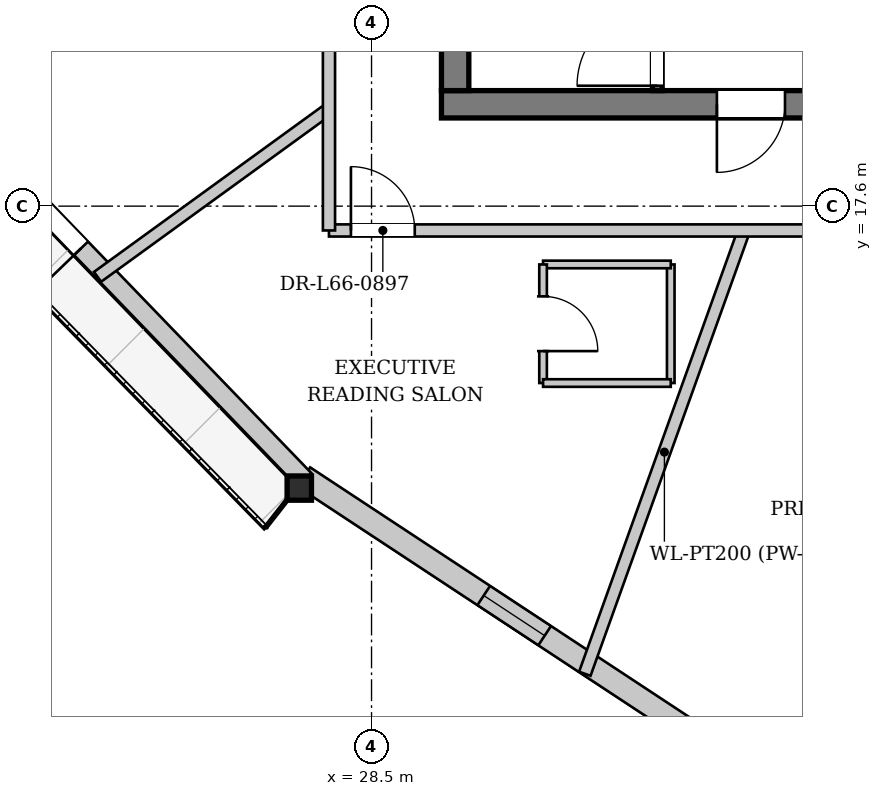
"""IFC4 building model, lengths in metres.
Left out: names, types, materials, properties, quantities, classifications, styles, units other than length and angle.
Written with IfcOpenShell. Run it as: python <this file> out.ifc"""

import sys

from ifc_helpers import new_model, si_unit, direction, frame, frame_2d, origin, origin_2d, place, context, subcontext, project, spatial, rectangle, i_section, extrude, source, transform, mapped, element, fill, save


model = new_model("IFC4")
c1 = context("Model", 3, precision=1e-05, world=origin(), true_north=direction((0.0, 1.0)))
c2 = subcontext(c1, "Body", "Model", "MODEL_VIEW")
j1 = project(units=[si_unit("LENGTHUNIT", "METRE"), si_unit("PLANEANGLEUNIT", "RADIAN")], contexts=[c1])
p1 = place(None, origin())
s1 = spatial("IfcSite", under=j1, at=p1, CompositionType="ELEMENT")
p2 = place(p1, origin())
s2 = spatial("IfcBuilding", under=s1, at=p2, CompositionType="ELEMENT")
p3 = place(p2, frame((0.0, 0.0, 248.9)))
s3 = spatial("IfcBuildingStorey", under=s2, at=p3, CompositionType="ELEMENT", Elevation=248.9)
m1 = source(origin(), c2, "Body", "SweptSolid", [
    extrude(i_section(OverallWidth=0.401, OverallDepth=0.399, WebThickness=0.022, FlangeThickness=0.034, at=origin_2d()), origin(), (0.0, 0.0, 1.0), 3.436),
])
p4 = place(p3, frame((27.282, 12.987, 0.0), z_axis=(0.017266623322, -0.013571708043, 0.999758807143), x_axis=(0.61796443076, 0.786206055888, 0.0)))
e1 = element("IfcColumn", 1, at=p4, inside=s3, PredefinedType="COLUMN", context=c2, shape_type="MappedRepresentation", body=[
    mapped(m1, transform((0.0, 0.0, 0.0), x_axis=(1.0, 0.0, 0.0), y_axis=(0.0, 1.0, 0.0), z_axis=(0.0, 0.0, 1.0), scale=1.0)),
])
p5 = place(p3, frame((41.979, 3.534, 0.0), z_axis=(0.0, 0.0, 1.0), x_axis=(-0.835124059856, 0.550061637136, 0.0)))
e2 = element("IfcWall", 2, at=p5, inside=s3, PredefinedType="SOLIDWALL", context=c2, shape_type="SweptSolid", body=[
    extrude(rectangle(XDim=17.474, YDim=0.38, at=frame_2d((8.737, 0.0))), origin(), (0.0, 0.0, 1.0), 2.872),
])
p6 = place(p5, frame((4.293, 0.0, 0.65)))
e3 = element("IfcOpeningElement", 3, at=p6, cuts=e2, PredefinedType="OPENING", context=c2, shape_type="SweptSolid", body=[
    extrude(rectangle(XDim=1.2, YDim=1.5, at=frame_2d((0.6, 0.75))), frame((0.0, 0.2, 0.0), z_axis=(0.0, -1.0, 0.0), x_axis=(1.0, 0.0, 0.0)), (0.0, 0.0, 1.0), 0.4),
])
p7 = place(p5, frame((12.731, 0.0, 0.65)))
e4 = element("IfcOpeningElement", 4, at=p7, cuts=e2, PredefinedType="OPENING", context=c2, shape_type="SweptSolid", body=[
    extrude(rectangle(XDim=1.2, YDim=1.5, at=frame_2d((0.6, 0.75))), frame((0.0, 0.2, 0.0), z_axis=(0.0, -1.0, 0.0), x_axis=(1.0, 0.0, 0.0)), (0.0, 0.0, 1.0), 0.4),
])
p8 = place(p3, frame((27.397, 13.098, 0.0), z_axis=(0.0, 0.0, 1.0), x_axis=(-0.694335154738, 0.719651785863, 0.0)))
e5 = element("IfcWall", 5, at=p8, inside=s3, PredefinedType="SOLIDWALL", context=c2, shape_type="SweptSolid", body=[
    extrude(rectangle(XDim=17.474, YDim=0.32, at=frame_2d((8.737, 0.0))), origin(), (0.0, 0.0, 1.0), 2.872),
])
p9 = place(p8, frame((5.292, 0.0, 0.0)))
e6 = element("IfcOpeningElement", 6, at=p9, cuts=e5, PredefinedType="OPENING", context=c2, shape_type="SweptSolid", body=[
    extrude(rectangle(XDim=1.5, YDim=2.3, at=frame_2d((0.75, 1.15))), frame((0.0, 0.17, 0.0), z_axis=(0.0, -1.0, 0.0), x_axis=(1.0, 0.0, 0.0)), (0.0, 0.0, 1.0), 0.34),
])
p10 = place(p8, frame((11.631, 0.0, 0.402)))
e7 = element("IfcOpeningElement", 7, at=p10, cuts=e5, PredefinedType="OPENING", context=c2, shape_type="SweptSolid", body=[
    extrude(rectangle(XDim=2.6, YDim=2.35, at=frame_2d((1.3, 1.175))), frame((0.0, 0.17, 0.0), z_axis=(0.0, -1.0, 0.0), x_axis=(1.0, 0.0, 0.0)), (0.0, 0.0, 1.0), 0.34),
])
p11 = place(p3, frame((46.35, 19.275, 0.0), z_axis=(0.0, 0.0, 1.0), x_axis=(-1.0, 0.0, 0.0)))
e8 = element("IfcWall", 8, at=p11, inside=s3, PredefinedType="SHEAR", context=c2, shape_type="SweptSolid", body=[
    extrude(rectangle(XDim=16.7, YDim=0.45, at=frame_2d((8.35, 0.0))), origin(), (0.0, 0.0, 1.0), 3.38),
])
p12 = place(p11, frame((4.55, 0.0, 0.0)))
e9 = element("IfcOpeningElement", 9, at=p12, cuts=e8, PredefinedType="OPENING", context=c2, shape_type="SweptSolid", body=[
    extrude(rectangle(XDim=1.12, YDim=2.25, at=frame_2d((0.56, 1.125))), frame((0.0, 0.235, 0.0), z_axis=(0.0, -1.0, 0.0), x_axis=(1.0, 0.0, 0.0)), (0.0, 0.0, 1.0), 0.47),
])
p13 = place(p11, frame((11.05, 0.0, 0.0)))
e10 = element("IfcOpeningElement", 10, at=p13, cuts=e8, PredefinedType="OPENING", context=c2, shape_type="SweptSolid", body=[
    extrude(rectangle(XDim=1.12, YDim=2.25, at=frame_2d((0.56, 1.125))), frame((0.0, 0.235, 0.0), z_axis=(0.0, -1.0, 0.0), x_axis=(1.0, 0.0, 0.0)), (0.0, 0.0, 1.0), 0.47),
])
p14 = place(p3, frame((29.875, 19.5, 0.0), z_axis=(0.0, 0.0, 1.0), x_axis=(0.0, 1.0, 0.0)))
e11 = element("IfcWall", 11, at=p14, inside=s3, PredefinedType="SHEAR", context=c2, shape_type="SweptSolid", body=[
    extrude(rectangle(XDim=14.2, YDim=0.45, at=frame_2d((7.1, 0.0))), origin(), (0.0, 0.0, 1.0), 3.38),
])
p15 = place(p14, frame((7.42, 0.0, 0.0)))
e12 = element("IfcOpeningElement", 12, at=p15, cuts=e11, PredefinedType="OPENING", context=c2, shape_type="SweptSolid", body=[
    extrude(rectangle(XDim=1.6, YDim=2.2, at=frame_2d((0.8, 1.1))), frame((0.0, 0.235, 0.0), z_axis=(0.0, -1.0, 0.0), x_axis=(1.0, 0.0, 0.0)), (0.0, 0.0, 1.0), 0.47),
])
p16 = place(p3, frame((33.2, 19.5, 0.0), z_axis=(0.0, 0.0, 1.0), x_axis=(0.0, 1.0, 0.0)))
e13 = element("IfcWall", 13, at=p16, inside=s3, PredefinedType="PARTITIONING", context=c2, shape_type="SweptSolid", body=[
    extrude(rectangle(XDim=7.46, YDim=0.16, at=frame_2d((3.73, 0.0))), origin(), (0.0, 0.0, 1.0), 3.38),
])
p17 = place(p16, frame((0.08, 0.0, 0.0)))
e14 = element("IfcOpeningElement", 14, at=p17, cuts=e13, PredefinedType="OPENING", context=c2, shape_type="SweptSolid", body=[
    extrude(rectangle(XDim=1.32, YDim=2.2, at=frame_2d((0.66, 1.1))), frame((0.0, 0.09, 0.0), z_axis=(0.0, -1.0, 0.0), x_axis=(1.0, 0.0, 0.0)), (0.0, 0.0, 1.0), 0.18),
])
p18 = place(p3, frame((34.625, 17.2, 0.0), z_axis=(0.0, 0.0, 1.0), x_axis=(-0.337893391222, -0.9411843901, 0.0)))
e15 = element("IfcWall", 15, at=p18, inside=s3, PredefinedType="PARTITIONING", context=c2, shape_type="SweptSolid", body=[
    extrude(rectangle(XDim=7.746, YDim=0.2, at=frame_2d((3.873, 0.0))), origin(), (0.0, 0.0, 1.0), 3.38),
])
p19 = place(p3, frame((27.8, 19.199, 0.0), z_axis=(0.0, 0.0, 1.0), x_axis=(-0.809388941901, -0.58727296952, 0.0)))
e16 = element("IfcWall", 16, at=p19, inside=s3, PredefinedType="PARTITIONING", context=c2, shape_type="SweptSolid", body=[
    extrude(rectangle(XDim=4.702, YDim=0.2, at=frame_2d((2.351, 0.0))), origin(), (0.0, 0.0, 1.0), 3.38),
])
p20 = place(p3, frame((33.421, 14.691, 0.0), z_axis=(0.0, 0.0, 1.0), x_axis=(0.0, 1.0, 0.0)))
e17 = element("IfcWall", 17, at=p20, inside=s3, PredefinedType="PARTITIONING", context=c2, shape_type="SweptSolid", body=[
    extrude(rectangle(XDim=1.95, YDim=0.125, at=frame_2d((0.975, 0.0))), origin(), (0.0, 0.0, 1.0), 3.38),
])
p21 = place(p3, frame((33.421, 16.641, 0.0), z_axis=(0.0, 0.0, 1.0), x_axis=(-1.0, 0.0, 0.0)))
e18 = element("IfcWall", 18, at=p21, inside=s3, PredefinedType="PARTITIONING", context=c2, shape_type="SweptSolid", body=[
    extrude(rectangle(XDim=2.1, YDim=0.125, at=frame_2d((1.05, 0.0))), origin(), (0.0, 0.0, 1.0), 3.38),
])
p22 = place(p3, frame((31.321, 16.641, 0.0), z_axis=(0.0, 0.0, 1.0), x_axis=(0.0, -1.0, 0.0)))
e19 = element("IfcWall", 19, at=p22, inside=s3, PredefinedType="PARTITIONING", context=c2, shape_type="SweptSolid", body=[
    extrude(rectangle(XDim=1.95, YDim=0.125, at=frame_2d((0.975, 0.0))), origin(), (0.0, 0.0, 1.0), 3.38),
])
p23 = place(p22, frame((0.525, 0.0, 0.0)))
e20 = element("IfcOpeningElement", 20, at=p23, cuts=e19, PredefinedType="OPENING", context=c2, shape_type="SweptSolid", body=[
    extrude(rectangle(XDim=0.9, YDim=2.1, at=frame_2d((0.45, 1.05))), frame((0.0, 0.073, 0.0), z_axis=(0.0, -1.0, 0.0), x_axis=(1.0, 0.0, 0.0)), (0.0, 0.0, 1.0), 0.145),
])
p24 = place(p3, frame((31.321, 14.691, 0.0), z_axis=(0.0, 0.0, 1.0), x_axis=(1.0, 0.0, 0.0)))
e21 = element("IfcWall", 21, at=p24, inside=s3, PredefinedType="PARTITIONING", context=c2, shape_type="SweptSolid", body=[
    extrude(rectangle(XDim=2.1, YDim=0.125, at=frame_2d((1.05, 0.0))), origin(), (0.0, 0.0, 1.0), 3.38),
])
p25 = place(p3, frame((27.8, 17.2, 0.0), z_axis=(0.0, 0.0, 1.0), x_axis=(1.0, 0.0, 0.0)))
e22 = element("IfcWall", 22, at=p25, inside=s3, PredefinedType="PARTITIONING", context=c2, shape_type="SweptSolid", body=[
    extrude(rectangle(XDim=20.4, YDim=0.2, at=frame_2d((10.2, 0.0))), origin(), (0.0, 0.0, 1.0), 3.38),
])
p26 = place(p25, frame((9.291, 0.0, 0.0)))
e23 = element("IfcOpeningElement", 23, at=p26, cuts=e22, PredefinedType="OPENING", context=c2, shape_type="SweptSolid", body=[
    extrude(rectangle(XDim=1.05, YDim=2.2, at=frame_2d((0.525, 1.1))), frame((0.0, 0.11, 0.0), z_axis=(0.0, -1.0, 0.0), x_axis=(1.0, 0.0, 0.0)), (0.0, 0.0, 1.0), 0.22),
])
p27 = place(p25, frame((17.616, 0.0, 0.0)))
e24 = element("IfcOpeningElement", 24, at=p27, cuts=e22, PredefinedType="OPENING", context=c2, shape_type="SweptSolid", body=[
    extrude(rectangle(XDim=1.05, YDim=2.2, at=frame_2d((0.525, 1.1))), frame((0.0, 0.11, 0.0), z_axis=(0.0, -1.0, 0.0), x_axis=(1.0, 0.0, 0.0)), (0.0, 0.0, 1.0), 0.22),
])
p28 = place(p25, frame((0.361, 0.0, 0.0)))
e25 = element("IfcOpeningElement", 25, at=p28, cuts=e22, PredefinedType="OPENING", context=c2, shape_type="SweptSolid", body=[
    extrude(rectangle(XDim=1.05, YDim=2.2, at=frame_2d((0.525, 1.1))), frame((0.0, 0.11, 0.0), z_axis=(0.0, -1.0, 0.0), x_axis=(1.0, 0.0, 0.0)), (0.0, 0.0, 1.0), 0.22),
])
p29 = place(p3, frame((27.8, 17.2, 0.0), z_axis=(0.0, 0.0, 1.0), x_axis=(0.0, 1.0, 0.0)))
e26 = element("IfcWall", 26, at=p29, inside=s3, PredefinedType="PARTITIONING", context=c2, shape_type="SweptSolid", body=[
    extrude(rectangle(XDim=18.8, YDim=0.2, at=frame_2d((9.4, 0.0))), origin(), (0.0, 0.0, 1.0), 3.38),
])
p30 = place(p29, frame((14.575, 0.0, 0.0)))
e27 = element("IfcOpeningElement", 27, at=p30, cuts=e26, PredefinedType="OPENING", context=c2, shape_type="SweptSolid", body=[
    extrude(rectangle(XDim=1.05, YDim=2.2, at=frame_2d((0.525, 1.1))), frame((0.0, 0.11, 0.0), z_axis=(0.0, -1.0, 0.0), x_axis=(1.0, 0.0, 0.0)), (0.0, 0.0, 1.0), 0.22),
])
p31 = place(p29, frame((4.68, 0.0, 0.0)))
e28 = element("IfcOpeningElement", 28, at=p31, cuts=e26, PredefinedType="OPENING", context=c2, shape_type="SweptSolid", body=[
    extrude(rectangle(XDim=1.05, YDim=2.2, at=frame_2d((0.525, 1.1))), frame((0.0, 0.11, 0.0), z_axis=(0.0, -1.0, 0.0), x_axis=(1.0, 0.0, 0.0)), (0.0, 0.0, 1.0), 0.22),
])
m2 = source(origin(), c2, "Body", "SweptSolid", [
    extrude(rectangle(XDim=1.2, YDim=1.5, at=frame_2d((0.6, 0.75))), frame((0.0, 0.03, 0.0), z_axis=(0.0, -1.0, 0.0), x_axis=(1.0, 0.0, 0.0)), (0.0, 0.0, 1.0), 0.06),
])
p32 = place(p7, origin())
e29 = element("IfcWindow", 29, at=p32, inside=s3, PartitioningType="SINGLE_PANEL", PredefinedType="WINDOW", context=c2, shape_type="MappedRepresentation", body=[
    mapped(m2, transform((0.0, 0.0, 0.0), x_axis=(1.0, 0.0, 0.0), y_axis=(0.0, 1.0, 0.0), z_axis=(0.0, 0.0, 1.0), scale=1.0)),
])
fill(e4, e29)
m3 = source(origin(), c2, "Body", "SweptSolid", [
    extrude(rectangle(XDim=1.5, YDim=2.3, at=frame_2d((0.75, 1.15))), frame((0.0, 0.025, 0.0), z_axis=(0.0, -1.0, 0.0), x_axis=(1.0, 0.0, 0.0)), (0.0, 0.0, 1.0), 0.05),
])
p33 = place(p9, origin())
e30 = element("IfcDoor", 30, at=p33, inside=s3, OperationType="DOUBLE_DOOR_SINGLE_SWING", PredefinedType="DOOR", context=c2, shape_type="MappedRepresentation", body=[
    mapped(m3, transform((0.0, 0.0, 0.0), x_axis=(1.0, 0.0, 0.0), y_axis=(0.0, 1.0, 0.0), z_axis=(0.0, 0.0, 1.0), scale=1.0)),
])
fill(e6, e30)
m4 = source(origin(), c2, "Body", "SweptSolid", [
    extrude(rectangle(XDim=1.12, YDim=2.25, at=frame_2d((0.56, 1.125))), frame((0.0, 0.025, 0.0), z_axis=(0.0, -1.0, 0.0), x_axis=(1.0, 0.0, 0.0)), (0.0, 0.0, 1.0), 0.05),
])
p34 = place(p13, origin())
e31 = element("IfcDoor", 31, at=p34, inside=s3, OperationType="SINGLE_SWING_RIGHT", PredefinedType="DOOR", context=c2, shape_type="MappedRepresentation", body=[
    mapped(m4, transform((0.0, 0.0, 0.0), x_axis=(1.0, 0.0, 0.0), y_axis=(0.0, 1.0, 0.0), z_axis=(0.0, 0.0, 1.0), scale=1.0)),
])
fill(e10, e31)
m5 = source(origin(), c2, "Body", "SweptSolid", [
    extrude(rectangle(XDim=1.32, YDim=2.2, at=frame_2d((0.66, 1.1))), frame((0.0, 0.025, 0.0), z_axis=(0.0, -1.0, 0.0), x_axis=(1.0, 0.0, 0.0)), (0.0, 0.0, 1.0), 0.05),
])
p35 = place(p17, origin())
e32 = element("IfcDoor", 32, at=p35, inside=s3, OperationType="SINGLE_SWING_LEFT", PredefinedType="DOOR", context=c2, shape_type="MappedRepresentation", body=[
    mapped(m5, transform((0.0, 0.0, 0.0), x_axis=(1.0, 0.0, 0.0), y_axis=(0.0, 1.0, 0.0), z_axis=(0.0, 0.0, 1.0), scale=1.0)),
])
fill(e14, e32)
m6 = source(origin(), c2, "Body", "SweptSolid", [
    extrude(rectangle(XDim=0.9, YDim=2.1, at=frame_2d((0.45, 1.05))), frame((0.0, 0.025, 0.0), z_axis=(0.0, -1.0, 0.0), x_axis=(1.0, 0.0, 0.0)), (0.0, 0.0, 1.0), 0.05),
])
p36 = place(p23, origin())
e33 = element("IfcDoor", 33, at=p36, inside=s3, OperationType="SINGLE_SWING_RIGHT", PredefinedType="DOOR", context=c2, shape_type="MappedRepresentation", body=[
    mapped(m6, transform((0.0, 0.0, 0.0), x_axis=(1.0, 0.0, 0.0), y_axis=(0.0, 1.0, 0.0), z_axis=(0.0, 0.0, 1.0), scale=1.0)),
])
fill(e20, e33)
m7 = source(origin(), c2, "Body", "SweptSolid", [
    extrude(rectangle(XDim=1.05, YDim=2.2, at=frame_2d((0.525, 1.1))), frame((0.0, 0.025, 0.0), z_axis=(0.0, -1.0, 0.0), x_axis=(1.0, 0.0, 0.0)), (0.0, 0.0, 1.0), 0.05),
])
p37 = place(p28, origin())
e34 = element("IfcDoor", 34, at=p37, inside=s3, OperationType="SINGLE_SWING_LEFT", PredefinedType="DOOR", context=c2, shape_type="MappedRepresentation", body=[
    mapped(m7, transform((0.0, 0.0, 0.0), x_axis=(1.0, 0.0, 0.0), y_axis=(0.0, 1.0, 0.0), z_axis=(0.0, 0.0, 1.0), scale=1.0)),
])
fill(e25, e34)
save(model, sys.argv[1])
